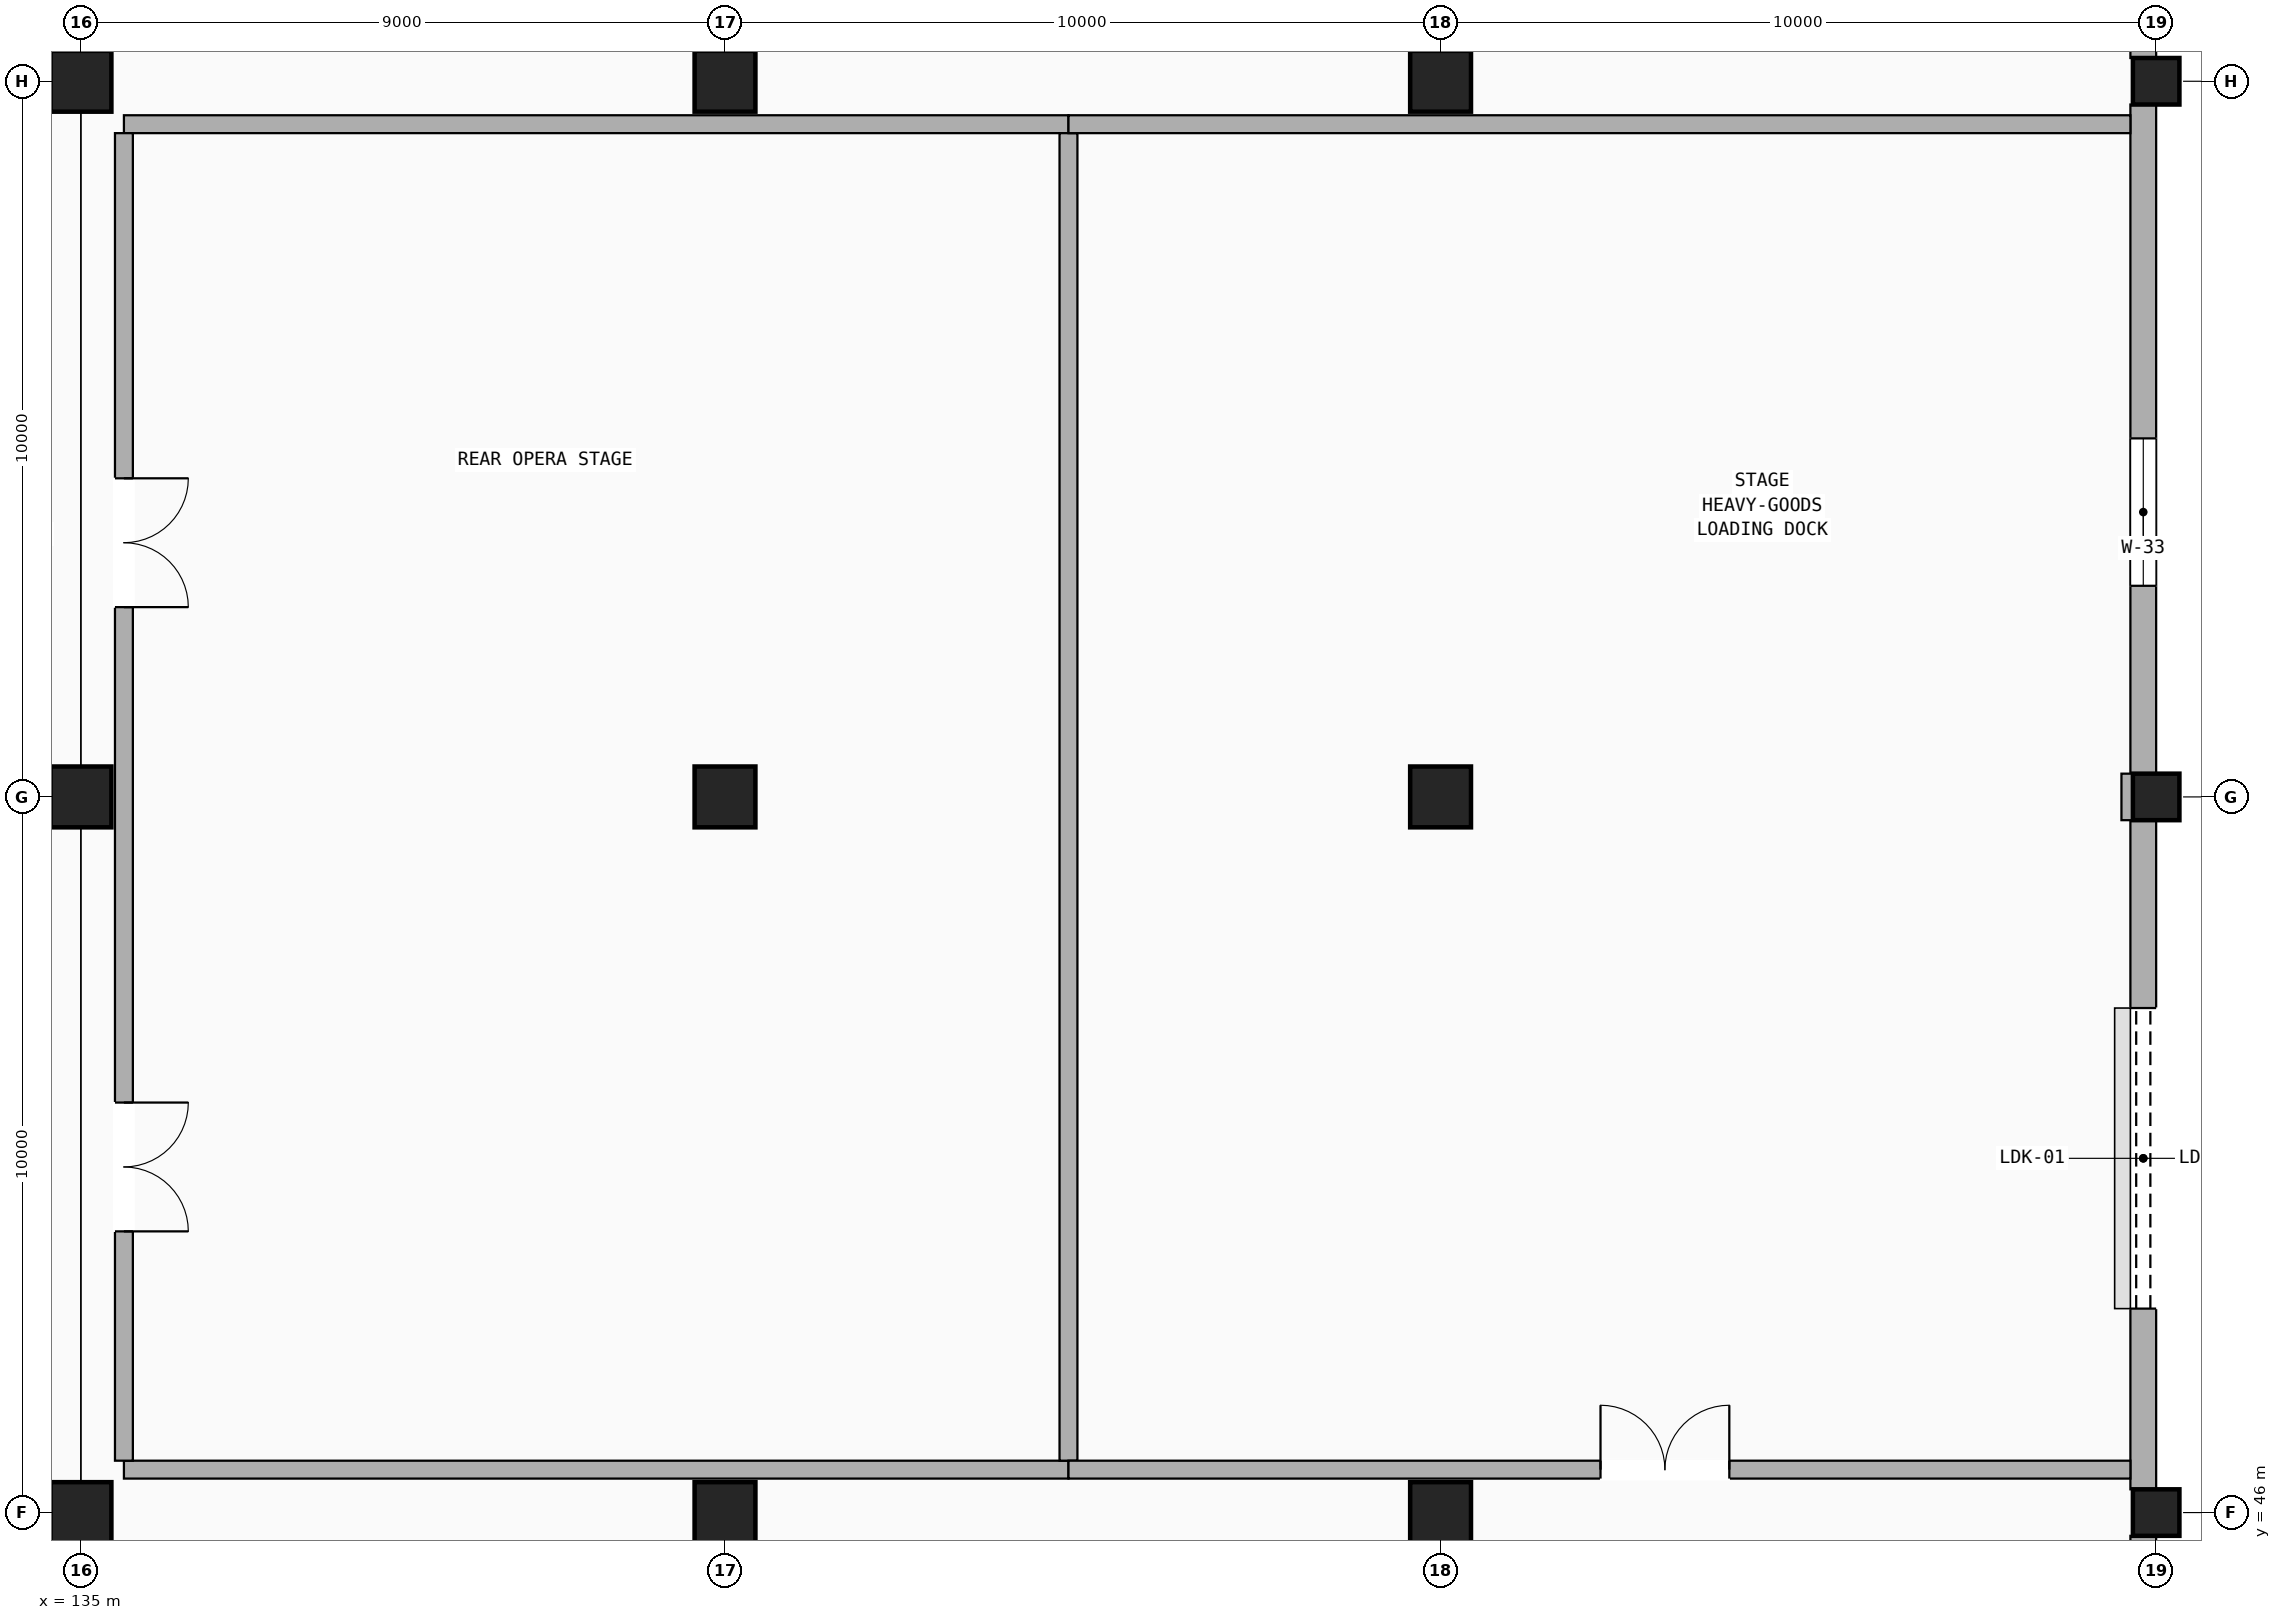
"""IFC4 building model, lengths in metres.
Left out: names, types, materials, properties, quantities, classifications, styles, units other than length and angle.
Written with IfcOpenShell. Run it as: python <this file> out.ifc"""

import sys

from ifc_helpers import new_model, si_unit, direction, frame, frame_2d, origin, origin_2d, place, context, subcontext, project, spatial, rectangle, extrude, element, fill, save


model = new_model("IFC4")
c1 = context("Model", 3, precision=1e-05, world=origin(), true_north=direction((0.0, 1.0)))
c2 = subcontext(c1, "Body", "Model", "MODEL_VIEW")
j1 = project(units=[si_unit("LENGTHUNIT", "METRE"), si_unit("PLANEANGLEUNIT", "RADIAN")], contexts=[c1])
p1 = place(None, origin())
s1 = spatial("IfcSite", under=j1, at=p1, CompositionType="ELEMENT")
p2 = place(p1, origin())
s2 = spatial("IfcBuilding", under=s1, at=p2, CompositionType="ELEMENT")
p3 = place(p2, origin())
s3 = spatial("IfcBuildingStorey", under=s2, at=p3, CompositionType="ELEMENT", Elevation=0.0)
for number, where, z_axis, x_axis in (
    (1, (135.0, 46.0, 0.0), (0.0, 0.0, 1.0), (1.0, 0.0, 0.0)),
    (2, (135.0, 56.0, 0.0), (0.0, 0.0, 1.0), (1.0, 0.0, 0.0)),
    (3, (135.0, 66.0, 0.0), (0.0, 0.0, 1.0), (1.0, 0.0, 0.0)),
    (4, (144.0, 46.0, 0.0), (0.0, 0.0, 1.0), (1.0, 0.0, 0.0)),
    (5, (144.0, 56.0, 0.0), (0.0, 0.0, 1.0), (1.0, 0.0, 0.0)),
    (6, (144.0, 66.0, 0.0), (0.0, 0.0, 1.0), (1.0, 0.0, 0.0)),
    (7, (154.0, 46.0, 0.0), (0.0, 0.0, 1.0), (1.0, 0.0, 0.0)),
    (8, (154.0, 56.0, 0.0), (0.0, 0.0, 1.0), (1.0, 0.0, 0.0)),
    (9, (154.0, 66.0, 0.0), (0.0, 0.0, 1.0), (1.0, 0.0, 0.0)),
):
    element("IfcColumn", number, at=place(p3, frame(where, z_axis=z_axis, x_axis=x_axis)), inside=s3, PredefinedType="COLUMN", context=c2, shape_type="SweptSolid", body=[
        extrude(rectangle(XDim=0.85, YDim=0.85, at=origin_2d()), origin(), (0.0, 0.0, 1.0), 5.1),
    ])
for number, where, z_axis, x_axis in (
    (10, (164.0, 46.0, 0.0), (0.0, 0.0, 1.0), (1.0, 0.0, 0.0)),
    (11, (164.0, 56.0, 0.0), (0.0, 0.0, 1.0), (1.0, 0.0, 0.0)),
    (12, (164.0, 66.0, 0.0), (0.0, 0.0, 1.0), (1.0, 0.0, 0.0)),
):
    element("IfcColumn", number, at=place(p3, frame(where, z_axis=z_axis, x_axis=x_axis)), inside=s3, PredefinedType="COLUMN", context=c2, shape_type="SweptSolid", body=[
        extrude(rectangle(XDim=0.65, YDim=0.65, at=origin_2d()), origin(), (0.0, 0.0, 1.0), 5.1),
    ])
p4 = place(p3, frame((163.82, 37.325, 0.0), z_axis=(0.0, 0.0, 1.0), x_axis=(0.0, 1.0, 0.0)))
e13 = element("IfcWall", 13, at=p4, inside=s3, PredefinedType="STANDARD", context=c2, shape_type="SweptSolid", body=[
    extrude(rectangle(XDim=8.35, YDim=0.36, at=frame_2d((4.175, 0.0))), origin(), (0.0, 0.0, 1.0), 4.08),
])
p5 = place(p4, frame((1.625, 0.0, 0.0)))
e14 = element("IfcOpeningElement", 14, at=p5, cuts=e13, PredefinedType="OPENING", context=c2, shape_type="SweptSolid", body=[
    extrude(rectangle(XDim=1.8, YDim=2.3, at=frame_2d((0.9, 1.15))), frame((0.0, 0.19, 0.0), z_axis=(0.0, -1.0, 0.0), x_axis=(1.0, 0.0, 0.0)), (0.0, 0.0, 1.0), 0.38),
])
p6 = place(p4, frame((5.75, 0.0, 0.9)))
e15 = element("IfcOpeningElement", 15, at=p6, cuts=e13, PredefinedType="OPENING", context=c2, shape_type="SweptSolid", body=[
    extrude(rectangle(XDim=1.2, YDim=1.6, at=frame_2d((0.6, 0.8))), frame((0.0, 0.19, 0.0), z_axis=(0.0, -1.0, 0.0), x_axis=(1.0, 0.0, 0.0)), (0.0, 0.0, 1.0), 0.38),
])
p7 = place(p3, frame((163.82, 66.325, 0.0), z_axis=(0.0, 0.0, 1.0), x_axis=(0.0, 1.0, 0.0)))
e16 = element("IfcWall", 16, at=p7, inside=s3, PredefinedType="STANDARD", context=c2, shape_type="SweptSolid", body=[
    extrude(rectangle(XDim=8.325, YDim=0.36, at=frame_2d((4.163, 0.0))), origin(), (0.0, 0.0, 1.0), 4.08),
])
p8 = place(p7, frame((1.625, 0.0, 0.0)))
e17 = element("IfcOpeningElement", 17, at=p8, cuts=e16, PredefinedType="OPENING", context=c2, shape_type="SweptSolid", body=[
    extrude(rectangle(XDim=1.8, YDim=2.3, at=frame_2d((0.9, 1.15))), frame((0.0, 0.19, 0.0), z_axis=(0.0, -1.0, 0.0), x_axis=(1.0, 0.0, 0.0)), (0.0, 0.0, 1.0), 0.38),
])
p9 = place(p7, frame((5.725, 0.0, 0.9)))
e18 = element("IfcOpeningElement", 18, at=p9, cuts=e16, PredefinedType="OPENING", context=c2, shape_type="SweptSolid", body=[
    extrude(rectangle(XDim=1.5, YDim=1.6, at=frame_2d((0.75, 0.8))), frame((0.0, 0.19, 0.0), z_axis=(0.0, -1.0, 0.0), x_axis=(1.0, 0.0, 0.0)), (0.0, 0.0, 1.0), 0.38),
])
p10 = place(p3, frame((163.82, 46.325, 0.0), z_axis=(0.0, 0.0, 1.0), x_axis=(0.0, 1.0, 0.0)))
e19 = element("IfcWall", 19, at=p10, inside=s3, PredefinedType="STANDARD", context=c2, shape_type="SweptSolid", body=[
    extrude(rectangle(XDim=9.35, YDim=0.36, at=frame_2d((4.675, 0.0))), origin(), (0.0, 0.0, 1.0), 4.08),
])
p11 = place(p10, frame((2.525, 0.0, 0.0)))
e20 = element("IfcOpeningElement", 20, at=p11, cuts=e19, PredefinedType="OPENING", context=c2, shape_type="SweptSolid", body=[
    extrude(rectangle(XDim=4.2, YDim=3.9, at=frame_2d((2.1, 1.95))), frame((0.0, 0.19, 0.0), z_axis=(0.0, -1.0, 0.0), x_axis=(1.0, 0.0, 0.0)), (0.0, 0.0, 1.0), 0.38),
])
p12 = place(p3, frame((163.82, 56.325, 0.0), z_axis=(0.0, 0.0, 1.0), x_axis=(0.0, 1.0, 0.0)))
e21 = element("IfcWall", 21, at=p12, inside=s3, PredefinedType="STANDARD", context=c2, shape_type="SweptSolid", body=[
    extrude(rectangle(XDim=9.35, YDim=0.36, at=frame_2d((4.675, 0.0))), origin(), (0.0, 0.0, 1.0), 4.08),
])
p13 = place(p12, frame((2.625, 0.0, 1.4)))
e22 = element("IfcOpeningElement", 22, at=p13, cuts=e21, PredefinedType="OPENING", context=c2, shape_type="SweptSolid", body=[
    extrude(rectangle(XDim=2.06, YDim=1.72, at=frame_2d((1.03, 0.86))), frame((0.0, 0.19, 0.0), z_axis=(0.0, -1.0, 0.0), x_axis=(1.0, 0.0, 0.0)), (0.0, 0.0, 1.0), 0.38),
])
p14 = place(p3, frame((135.6, 46.6, 0.0), z_axis=(0.0, 0.0, 1.0), x_axis=(1.0, 0.0, 0.0)))
e23 = element("IfcWall", 23, at=p14, inside=s3, PredefinedType="PARTITIONING", context=c2, shape_type="SweptSolid", body=[
    extrude(rectangle(XDim=13.2, YDim=0.25, at=frame_2d((6.6, 0.0))), origin(), (0.0, 0.0, 1.0), 4.18),
])
p15 = place(p3, frame((135.6, 65.4, 0.0), z_axis=(0.0, 0.0, 1.0), x_axis=(1.0, 0.0, 0.0)))
e24 = element("IfcWall", 24, at=p15, inside=s3, PredefinedType="PARTITIONING", context=c2, shape_type="SweptSolid", body=[
    extrude(rectangle(XDim=13.2, YDim=0.25, at=frame_2d((6.6, 0.0))), origin(), (0.0, 0.0, 1.0), 3.98),
])
p16 = place(p3, frame((135.6, 46.725, 0.0), z_axis=(0.0, 0.0, 1.0), x_axis=(0.0, 1.0, 0.0)))
e25 = element("IfcWall", 25, at=p16, inside=s3, PredefinedType="PARTITIONING", context=c2, shape_type="SweptSolid", body=[
    extrude(rectangle(XDim=18.55, YDim=0.25, at=frame_2d((9.275, 0.0))), origin(), (0.0, 0.0, 1.0), 3.83),
])
p17 = place(p16, frame((3.204, 0.0, 0.0)))
e26 = element("IfcOpeningElement", 26, at=p17, cuts=e25, PredefinedType="OPENING", context=c2, shape_type="SweptSolid", body=[
    extrude(rectangle(XDim=1.8, YDim=2.3, at=frame_2d((0.9, 1.15))), frame((0.0, 0.135, 0.0), z_axis=(0.0, -1.0, 0.0), x_axis=(1.0, 0.0, 0.0)), (0.0, 0.0, 1.0), 0.27),
])
p18 = place(p16, frame((11.927, 0.0, 0.0)))
e27 = element("IfcOpeningElement", 27, at=p18, cuts=e25, PredefinedType="OPENING", context=c2, shape_type="SweptSolid", body=[
    extrude(rectangle(XDim=1.8, YDim=2.3, at=frame_2d((0.9, 1.15))), frame((0.0, 0.135, 0.0), z_axis=(0.0, -1.0, 0.0), x_axis=(1.0, 0.0, 0.0)), (0.0, 0.0, 1.0), 0.27),
])
p19 = place(p3, frame((148.8, 46.725, 0.0), z_axis=(0.0, 0.0, 1.0), x_axis=(0.0, 1.0, 0.0)))
e28 = element("IfcWall", 28, at=p19, inside=s3, PredefinedType="PARTITIONING", context=c2, shape_type="SweptSolid", body=[
    extrude(rectangle(XDim=18.55, YDim=0.25, at=frame_2d((9.275, 0.0))), origin(), (0.0, 0.0, 1.0), 3.83),
])
p20 = place(p3, frame((148.8, 46.6, 0.0), z_axis=(0.0, 0.0, 1.0), x_axis=(1.0, 0.0, 0.0)))
e29 = element("IfcWall", 29, at=p20, inside=s3, PredefinedType="PARTITIONING", context=c2, shape_type="SweptSolid", body=[
    extrude(rectangle(XDim=14.84, YDim=0.25, at=frame_2d((7.42, 0.0))), origin(), (0.0, 0.0, 1.0), 4.18),
])
p21 = place(p20, frame((7.435, 0.0, 0.0)))
e30 = element("IfcOpeningElement", 30, at=p21, cuts=e29, PredefinedType="OPENING", context=c2, shape_type="SweptSolid", body=[
    extrude(rectangle(XDim=1.8, YDim=2.3, at=frame_2d((0.9, 1.15))), frame((0.0, 0.135, 0.0), z_axis=(0.0, -1.0, 0.0), x_axis=(1.0, 0.0, 0.0)), (0.0, 0.0, 1.0), 0.27),
])
p22 = place(p3, frame((148.8, 65.4, 0.0), z_axis=(0.0, 0.0, 1.0), x_axis=(1.0, 0.0, 0.0)))
e31 = element("IfcWall", 31, at=p22, inside=s3, PredefinedType="PARTITIONING", context=c2, shape_type="SweptSolid", body=[
    extrude(rectangle(XDim=14.84, YDim=0.25, at=frame_2d((7.42, 0.0))), origin(), (0.0, 0.0, 1.0), 3.98),
])
p23 = place(p3, frame((163.64, 55.675, 0.0), z_axis=(0.0, 0.0, 1.0), x_axis=(0.0, 1.0, 0.0)))
e32 = element("IfcWall", 32, at=p23, inside=s3, PredefinedType="PARTITIONING", context=c2, shape_type="SweptSolid", body=[
    extrude(rectangle(XDim=0.65, YDim=0.25, at=frame_2d((0.325, 0.0))), origin(), (0.0, 0.0, 1.0), 3.98),
])
p24 = place(p11, frame((4.2, 0.0, 0.0), z_axis=(0.0, 0.0, 1.0), x_axis=(-1.0, 0.0, 0.0)))
e33 = element("IfcDoor", 33, at=p24, inside=s3, OperationType="ROLLINGUP", PredefinedType="DOOR", context=c2, shape_type="SweptSolid", body=[
    extrude(rectangle(XDim=4.2, YDim=3.9, at=frame_2d((2.1, 1.95))), frame((0.0, 0.025, 0.0), z_axis=(0.0, -1.0, 0.0), x_axis=(1.0, 0.0, 0.0)), (0.0, 0.0, 1.0), 0.05),
])
fill(e20, e33)
p25 = place(p13, origin())
e34 = element("IfcWindow", 34, at=p25, inside=s3, PartitioningType="DOUBLE_PANEL_VERTICAL", PredefinedType="WINDOW", context=c2, shape_type="SweptSolid", body=[
    extrude(rectangle(XDim=2.06, YDim=1.72, at=frame_2d((1.03, 0.86))), frame((0.0, 0.03, 0.0), z_axis=(0.0, -1.0, 0.0), x_axis=(1.0, 0.0, 0.0)), (0.0, 0.0, 1.0), 0.06),
])
fill(e22, e34)
p26 = place(p17, frame((1.8, 0.0, 0.0), z_axis=(0.0, 0.0, 1.0), x_axis=(-1.0, 0.0, 0.0)))
e35 = element("IfcDoor", 35, at=p26, inside=s3, OperationType="DOUBLE_DOOR_SINGLE_SWING", PredefinedType="DOOR", context=c2, shape_type="SweptSolid", body=[
    extrude(rectangle(XDim=1.8, YDim=2.3, at=frame_2d((0.9, 1.15))), frame((0.0, 0.025, 0.0), z_axis=(0.0, -1.0, 0.0), x_axis=(1.0, 0.0, 0.0)), (0.0, 0.0, 1.0), 0.05),
])
fill(e26, e35)
p27 = place(p18, frame((1.8, 0.0, 0.0), z_axis=(0.0, 0.0, 1.0), x_axis=(-1.0, 0.0, 0.0)))
e36 = element("IfcDoor", 36, at=p27, inside=s3, OperationType="DOUBLE_DOOR_SINGLE_SWING", PredefinedType="DOOR", context=c2, shape_type="SweptSolid", body=[
    extrude(rectangle(XDim=1.8, YDim=2.3, at=frame_2d((0.9, 1.15))), frame((0.0, 0.025, 0.0), z_axis=(0.0, -1.0, 0.0), x_axis=(1.0, 0.0, 0.0)), (0.0, 0.0, 1.0), 0.05),
])
fill(e27, e36)
p28 = place(p21, origin())
e37 = element("IfcDoor", 37, at=p28, inside=s3, OperationType="DOUBLE_DOOR_SINGLE_SWING", PredefinedType="DOOR", context=c2, shape_type="SweptSolid", body=[
    extrude(rectangle(XDim=1.8, YDim=2.3, at=frame_2d((0.9, 1.15))), frame((0.0, 0.025, 0.0), z_axis=(0.0, -1.0, 0.0), x_axis=(1.0, 0.0, 0.0)), (0.0, 0.0, 1.0), 0.05),
])
fill(e30, e37)
save(model, sys.argv[1])
